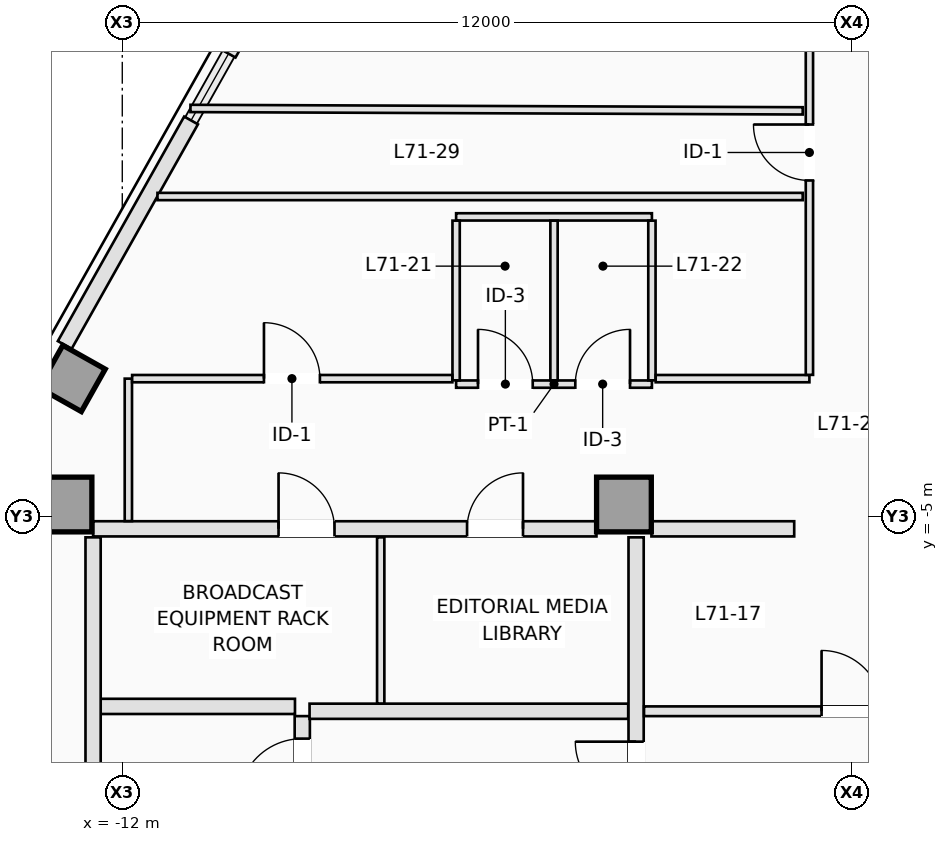
"""IFC4 building model, lengths in metres.
Left out: names, types, materials, properties, quantities, classifications, styles, units other than length and angle.
Written with IfcOpenShell. Run it as: python <this file> out.ifc"""

import sys

from ifc_helpers import new_model, si_unit, direction, frame, frame_2d, origin, origin_2d, place, context, subcontext, project, spatial, rectangle, extrude, element, fill, save


model = new_model("IFC4")
c1 = context("Model", 3, precision=1e-05, world=origin(), true_north=direction((0.0, 1.0)))
c2 = subcontext(c1, "Body", "Model", "MODEL_VIEW")
j1 = project(units=[si_unit("LENGTHUNIT", "METRE"), si_unit("PLANEANGLEUNIT", "RADIAN")], contexts=[c1])
p1 = place(None, origin())
s1 = spatial("IfcSite", under=j1, at=p1, CompositionType="ELEMENT")
p2 = place(p1, origin())
s2 = spatial("IfcBuilding", under=s1, at=p2, CompositionType="ELEMENT")
p3 = place(p2, frame((0.0, 0.0, 256.9)))
s3 = spatial("IfcBuildingStorey", under=s2, at=p3, CompositionType="ELEMENT", Elevation=256.9)
for number, where, z_axis, x_axis in (
    (1, (-12.95, -4.8, 0.0), (0.0, 0.0, 1.0), (1.0, 0.0, 0.0)),
    (2, (-3.75, -4.8, 0.0), (0.0, 0.0, 1.0), (1.0, 0.0, 0.0)),
):
    element("IfcColumn", number, at=place(p3, frame(where, z_axis=z_axis, x_axis=x_axis)), inside=s3, PredefinedType="COLUMN", context=c2, shape_type="SweptSolid", body=[
        extrude(rectangle(XDim=0.9, YDim=0.9, at=origin_2d()), origin(), (0.0, 0.0, 1.0), 3.5),
    ])
p4 = place(p3, frame((-12.825, -2.727, 0.0), z_axis=(0.0, 0.0, 1.0), x_axis=(-0.871575139605, 0.490261946333, 0.0)))
e3 = element("IfcColumn", 3, at=p4, inside=s3, PredefinedType="COLUMN", context=c2, shape_type="SweptSolid", body=[
    extrude(rectangle(XDim=0.8, YDim=0.8, at=origin_2d()), origin(), (0.0, 0.0, 1.0), 3.5),
])
p5 = place(p3, frame((-12.946, -2.177, 0.0), z_axis=(0.0, 0.0, 1.0), x_axis=(0.490244825075, 0.871584770109, 0.0)))
e4 = element("IfcWall", 4, at=p5, inside=s3, PredefinedType="STANDARD", context=c2, shape_type="SweptSolid", body=[
    extrude(rectangle(XDim=4.237, YDim=0.26, at=frame_2d((2.119, 0.0))), origin(), (0.0, 0.0, 1.0), 3.25),
])
p6 = place(p3, frame((-10.251, 2.615, 0.0), z_axis=(0.0, 0.0, 1.0), x_axis=(0.490269447258, 0.871570920284, 0.0)))
e5 = element("IfcWall", 5, at=p6, inside=s3, PredefinedType="STANDARD", context=c2, shape_type="SweptSolid", body=[
    extrude(rectangle(XDim=4.237, YDim=0.26, at=frame_2d((2.118, 0.0))), origin(), (0.0, 0.0, 1.0), 3.25),
])
p7 = place(p3, frame((-9.04, -10.18, 0.0), z_axis=(0.0, 0.0, 1.0), x_axis=(0.0, 1.0, 0.0)))
e6 = element("IfcWall", 6, at=p7, inside=s3, PredefinedType="PARTITIONING", context=c2, shape_type="SweptSolid", body=[
    extrude(rectangle(XDim=1.9, YDim=0.25, at=frame_2d((0.95, 0.0))), origin(), (0.0, 0.0, 1.0), 3.25),
])
p8 = place(p7, frame((0.48, 0.0, 0.0)))
e7 = element("IfcOpeningElement", 7, at=p8, cuts=e6, PredefinedType="OPENING", context=c2, shape_type="SweptSolid", body=[
    extrude(rectangle(XDim=1.05, YDim=2.15, at=frame_2d((0.525, 1.075))), frame((0.0, 0.135, 0.0), z_axis=(0.0, -1.0, 0.0), x_axis=(1.0, 0.0, 0.0)), (0.0, 0.0, 1.0), 0.27),
])
p9 = place(p3, frame((-12.38, -8.12, 0.0), z_axis=(0.0, 0.0, 1.0), x_axis=(1.0, 0.0, 0.0)))
e8 = element("IfcWall", 8, at=p9, inside=s3, PredefinedType="PARTITIONING", context=c2, shape_type="SweptSolid", body=[
    extrude(rectangle(XDim=3.22, YDim=0.25, at=frame_2d((1.61, 0.0))), origin(), (0.0, 0.0, 1.0), 3.25),
])
p10 = place(p3, frame((-12.48, -10.18, 0.0), z_axis=(0.0, 0.0, 1.0), x_axis=(0.0, 1.0, 0.0)))
e9 = element("IfcWall", 9, at=p10, inside=s3, PredefinedType="PARTITIONING", context=c2, shape_type="SweptSolid", body=[
    extrude(rectangle(XDim=4.84, YDim=0.25, at=frame_2d((2.42, 0.0))), origin(), (0.0, 0.0, 1.0), 3.25),
])
p11 = place(p3, frame((-8.92, -8.2, 0.0), z_axis=(0.0, 0.0, 1.0), x_axis=(1.0, 0.0, 0.0)))
e10 = element("IfcWall", 10, at=p11, inside=s3, PredefinedType="PARTITIONING", context=c2, shape_type="SweptSolid", body=[
    extrude(rectangle(XDim=5.24, YDim=0.25, at=frame_2d((2.62, 0.0))), origin(), (0.0, 0.0, 1.0), 3.25),
])
p12 = place(p3, frame((-3.55, -15.898, 0.0), z_axis=(0.0, 0.0, 1.0), x_axis=(0.0, 1.0, 0.0)))
e11 = element("IfcWall", 11, at=p12, inside=s3, PredefinedType="PARTITIONING", context=c2, shape_type="SweptSolid", body=[
    extrude(rectangle(XDim=10.558, YDim=0.25, at=frame_2d((5.279, 0.0))), origin(), (0.0, 0.0, 1.0), 3.25),
])
p13 = place(p12, frame((6.198, 0.0, 0.0)))
e12 = element("IfcOpeningElement", 12, at=p13, cuts=e11, PredefinedType="OPENING", context=c2, shape_type="SweptSolid", body=[
    extrude(rectangle(XDim=1.0, YDim=2.15, at=frame_2d((0.5, 1.075))), frame((0.0, 0.135, 0.0), z_axis=(0.0, -1.0, 0.0), x_axis=(1.0, 0.0, 0.0)), (0.0, 0.0, 1.0), 0.27),
])
p14 = place(p3, frame((-12.48, -5.2, 0.0), z_axis=(0.0, 0.0, 1.0), x_axis=(1.0, 0.0, 0.0)))
e13 = element("IfcWall", 13, at=p14, inside=s3, PredefinedType="PARTITIONING", context=c2, shape_type="SweptSolid", body=[
    extrude(rectangle(XDim=8.278, YDim=0.25, at=frame_2d((4.139, 0.0))), origin(), (0.0, 0.0, 1.0), 3.25),
])
p15 = place(p14, frame((3.05, 0.0, 0.0)))
e14 = element("IfcOpeningElement", 14, at=p15, cuts=e13, PredefinedType="OPENING", context=c2, shape_type="SweptSolid", body=[
    extrude(rectangle(XDim=0.92, YDim=2.12, at=frame_2d((0.46, 1.06))), frame((0.0, 0.135, 0.0), z_axis=(0.0, -1.0, 0.0), x_axis=(1.0, 0.0, 0.0)), (0.0, 0.0, 1.0), 0.27),
])
p16 = place(p14, frame((6.15, 0.0, 0.0)))
e15 = element("IfcOpeningElement", 15, at=p16, cuts=e13, PredefinedType="OPENING", context=c2, shape_type="SweptSolid", body=[
    extrude(rectangle(XDim=0.92, YDim=2.12, at=frame_2d((0.46, 1.06))), frame((0.0, 0.135, 0.0), z_axis=(0.0, -1.0, 0.0), x_axis=(1.0, 0.0, 0.0)), (0.0, 0.0, 1.0), 0.27),
])
p17 = place(p3, frame((-3.298, -5.2, 0.0), z_axis=(0.0, 0.0, 1.0), x_axis=(1.0, 0.0, 0.0)))
e16 = element("IfcWall", 16, at=p17, inside=s3, PredefinedType="PARTITIONING", context=c2, shape_type="SweptSolid", body=[
    extrude(rectangle(XDim=2.348, YDim=0.25, at=frame_2d((1.174, 0.0))), origin(), (0.0, 0.0, 1.0), 3.25),
])
p18 = place(p3, frame((-7.75, -8.073, 0.0), z_axis=(0.0, 0.0, 1.0), x_axis=(0.0, 1.0, 0.0)))
e17 = element("IfcWall", 17, at=p18, inside=s3, PredefinedType="PARTITIONING", context=c2, shape_type="SweptSolid", body=[
    extrude(rectangle(XDim=2.733, YDim=0.12, at=frame_2d((1.366, 0.0))), origin(), (0.0, 0.0, 1.0), 3.25),
])
p19 = place(p3, frame((-3.42, -8.2, 0.0), z_axis=(0.0, 0.0, 1.0), x_axis=(1.0, 0.0, 0.0)))
e18 = element("IfcWall", 18, at=p19, inside=s3, PredefinedType="PARTITIONING", context=c2, shape_type="SweptSolid", body=[
    extrude(rectangle(XDim=6.84, YDim=0.16, at=frame_2d((3.42, 0.0))), origin(), (0.0, 0.0, 1.0), 3.25),
])
p20 = place(p19, frame((2.92, 0.0, 0.0)))
e19 = element("IfcOpeningElement", 19, at=p20, cuts=e18, PredefinedType="OPENING", context=c2, shape_type="SweptSolid", body=[
    extrude(rectangle(XDim=1.0, YDim=2.15, at=frame_2d((0.5, 1.075))), frame((0.0, 0.09, 0.0), z_axis=(0.0, -1.0, 0.0), x_axis=(1.0, 0.0, 0.0)), (0.0, 0.0, 1.0), 0.18),
])
p21 = place(p3, frame((-6.51, -2.82, 0.0), z_axis=(0.0, 0.0, 1.0), x_axis=(1.0, 0.0, 0.0)))
e20 = element("IfcWall", 20, at=p21, inside=s3, PredefinedType="PARTITIONING", context=c2, shape_type="SweptSolid", body=[
    extrude(rectangle(XDim=3.22, YDim=0.12, at=frame_2d((1.61, 0.0))), origin(), (0.0, 0.0, 1.0), 2.943),
])
p22 = place(p21, frame((0.36, 0.0, 0.0)))
e21 = element("IfcOpeningElement", 21, at=p22, cuts=e20, PredefinedType="OPENING", context=c2, shape_type="SweptSolid", body=[
    extrude(rectangle(XDim=0.9, YDim=2.12, at=frame_2d((0.45, 1.06))), frame((0.0, 0.07, 0.0), z_axis=(0.0, -1.0, 0.0), x_axis=(1.0, 0.0, 0.0)), (0.0, 0.0, 1.0), 0.14),
])
p23 = place(p21, frame((1.96, 0.0, 0.0)))
e22 = element("IfcOpeningElement", 22, at=p23, cuts=e20, PredefinedType="OPENING", context=c2, shape_type="SweptSolid", body=[
    extrude(rectangle(XDim=0.9, YDim=2.12, at=frame_2d((0.45, 1.06))), frame((0.0, 0.07, 0.0), z_axis=(0.0, -1.0, 0.0), x_axis=(1.0, 0.0, 0.0)), (0.0, 0.0, 1.0), 0.14),
])
p24 = place(p3, frame((-6.51, -0.07, 0.0), z_axis=(0.0, 0.0, 1.0), x_axis=(1.0, 0.0, 0.0)))
e23 = element("IfcWall", 23, at=p24, inside=s3, PredefinedType="PARTITIONING", context=c2, shape_type="SweptSolid", body=[
    extrude(rectangle(XDim=3.22, YDim=0.12, at=frame_2d((1.61, 0.0))), origin(), (0.0, 0.0, 1.0), 3.25),
])
for number, where, z_axis, x_axis in (
    (24, (-6.51, -2.758, 0.0), (0.0, 0.0, 1.0), (0.0, 1.0, 0.0)),
    (25, (-4.9, -2.758, 0.0), (0.0, 0.0, 1.0), (0.0, 1.0, 0.0)),
):
    element("IfcWall", number, at=place(p3, frame(where, z_axis=z_axis, x_axis=x_axis)), inside=s3, PredefinedType="PARTITIONING", context=c2, shape_type="SweptSolid", body=[
        extrude(rectangle(XDim=2.626, YDim=0.12, at=frame_2d((1.313, 0.0))), origin(), (0.0, 0.0, 1.0), 3.25),
    ])
p25 = place(p3, frame((-3.29, -2.758, 0.0), z_axis=(0.0, 0.0, 1.0), x_axis=(0.0, 1.0, 0.0)))
e26 = element("IfcWall", 26, at=p25, inside=s3, PredefinedType="PARTITIONING", context=c2, shape_type="SweptSolid", body=[
    extrude(rectangle(XDim=2.626, YDim=0.12, at=frame_2d((1.313, 0.0))), origin(), (0.0, 0.0, 1.0), 2.79),
])
p26 = place(p3, frame((-11.9, -5.073, 0.0), z_axis=(0.0, 0.0, 1.0), x_axis=(0.0, 1.0, 0.0)))
e27 = element("IfcWall", 27, at=p26, inside=s3, PredefinedType="PARTITIONING", context=c2, shape_type="SweptSolid", body=[
    extrude(rectangle(XDim=2.343, YDim=0.12, at=frame_2d((1.171, 0.0))), origin(), (0.0, 0.0, 1.0), 3.25),
])
p27 = place(p3, frame((-11.838, -2.73, 0.0), z_axis=(0.0, 0.0, 1.0), x_axis=(1.0, 0.0, 0.0)))
e28 = element("IfcWall", 28, at=p27, inside=s3, PredefinedType="PARTITIONING", context=c2, shape_type="SweptSolid", body=[
    extrude(rectangle(XDim=5.266, YDim=0.12, at=frame_2d((2.633, 0.0))), origin(), (0.0, 0.0, 1.0), 3.25),
])
p28 = place(p27, frame((2.168, 0.0, 0.0)))
e29 = element("IfcOpeningElement", 29, at=p28, cuts=e28, PredefinedType="OPENING", context=c2, shape_type="SweptSolid", body=[
    extrude(rectangle(XDim=0.92, YDim=2.12, at=frame_2d((0.46, 1.06))), frame((0.0, 0.07, 0.0), z_axis=(0.0, -1.0, 0.0), x_axis=(1.0, 0.0, 0.0)), (0.0, 0.0, 1.0), 0.14),
])
p29 = place(p3, frame((-3.228, -2.73, 0.0), z_axis=(0.0, 0.0, 1.0), x_axis=(1.0, 0.0, 0.0)))
e30 = element("IfcWall", 30, at=p29, inside=s3, PredefinedType="PARTITIONING", context=c2, shape_type="SweptSolid", body=[
    extrude(rectangle(XDim=2.528, YDim=0.12, at=frame_2d((1.264, 0.0))), origin(), (0.0, 0.0, 1.0), 2.943),
])
p30 = place(p3, frame((-0.7, -2.668, 0.0), z_axis=(0.0, 0.0, 1.0), x_axis=(0.0, 1.0, 0.0)))
e31 = element("IfcWall", 31, at=p30, inside=s3, PredefinedType="PARTITIONING", context=c2, shape_type="SweptSolid", body=[
    extrude(rectangle(XDim=5.968, YDim=0.12, at=frame_2d((2.984, 0.0))), origin(), (0.0, 0.0, 1.0), 3.25),
])
p31 = place(p30, frame((3.197, 0.0, 0.0)))
e32 = element("IfcOpeningElement", 32, at=p31, cuts=e31, PredefinedType="OPENING", context=c2, shape_type="SweptSolid", body=[
    extrude(rectangle(XDim=0.92, YDim=2.12, at=frame_2d((0.46, 1.06))), frame((0.0, 0.07, 0.0), z_axis=(0.0, -1.0, 0.0), x_axis=(1.0, 0.0, 0.0)), (0.0, 0.0, 1.0), 0.14),
])
p32 = place(p3, frame((-0.81, 1.673, 0.0), z_axis=(0.0, 0.0, 1.0), x_axis=(-0.999992189826, 0.003952250787, 0.0)))
e33 = element("IfcWall", 33, at=p32, inside=s3, PredefinedType="PARTITIONING", context=c2, shape_type="SweptSolid", body=[
    extrude(rectangle(XDim=10.069, YDim=0.12, at=frame_2d((5.034, 0.0))), origin(), (0.0, 0.0, 1.0), 3.25),
])
p33 = place(p3, frame((-0.81, 0.265, 0.0), z_axis=(0.0, 0.0, 1.0), x_axis=(-1.0, 0.0, 0.0)))
e34 = element("IfcWall", 34, at=p33, inside=s3, PredefinedType="PARTITIONING", context=c2, shape_type="SweptSolid", body=[
    extrude(rectangle(XDim=10.611, YDim=0.12, at=frame_2d((5.306, 0.0))), origin(), (0.0, 0.0, 1.0), 3.25),
])
p34 = place(p8, origin())
e35 = element("IfcDoor", 35, at=p34, inside=s3, OperationType="SINGLE_SWING_LEFT", PredefinedType="DOOR", context=c2, shape_type="SweptSolid", body=[
    extrude(rectangle(XDim=1.05, YDim=2.15, at=frame_2d((0.525, 1.075))), frame((0.0, 0.025, 0.0), z_axis=(0.0, -1.0, 0.0), x_axis=(1.0, 0.0, 0.0)), (0.0, 0.0, 1.0), 0.05),
])
fill(e7, e35)
p35 = place(p13, origin())
e36 = element("IfcDoor", 36, at=p35, inside=s3, OperationType="SINGLE_SWING_RIGHT", PredefinedType="DOOR", context=c2, shape_type="SweptSolid", body=[
    extrude(rectangle(XDim=1.0, YDim=2.15, at=frame_2d((0.5, 1.075))), frame((0.0, 0.025, 0.0), z_axis=(0.0, -1.0, 0.0), x_axis=(1.0, 0.0, 0.0)), (0.0, 0.0, 1.0), 0.05),
])
fill(e12, e36)
p36 = place(p15, origin())
e37 = element("IfcDoor", 37, at=p36, inside=s3, OperationType="SINGLE_SWING_LEFT", PredefinedType="DOOR", context=c2, shape_type="SweptSolid", body=[
    extrude(rectangle(XDim=0.92, YDim=2.12, at=frame_2d((0.46, 1.06))), frame((0.0, 0.025, 0.0), z_axis=(0.0, -1.0, 0.0), x_axis=(1.0, 0.0, 0.0)), (0.0, 0.0, 1.0), 0.05),
])
fill(e14, e37)
p37 = place(p16, origin())
e38 = element("IfcDoor", 38, at=p37, inside=s3, OperationType="SINGLE_SWING_RIGHT", PredefinedType="DOOR", context=c2, shape_type="SweptSolid", body=[
    extrude(rectangle(XDim=0.92, YDim=2.12, at=frame_2d((0.46, 1.06))), frame((0.0, 0.025, 0.0), z_axis=(0.0, -1.0, 0.0), x_axis=(1.0, 0.0, 0.0)), (0.0, 0.0, 1.0), 0.05),
])
fill(e15, e38)
p38 = place(p20, origin())
e39 = element("IfcDoor", 39, at=p38, inside=s3, OperationType="SINGLE_SWING_LEFT", PredefinedType="DOOR", context=c2, shape_type="SweptSolid", body=[
    extrude(rectangle(XDim=1.0, YDim=2.15, at=frame_2d((0.5, 1.075))), frame((0.0, 0.025, 0.0), z_axis=(0.0, -1.0, 0.0), x_axis=(1.0, 0.0, 0.0)), (0.0, 0.0, 1.0), 0.05),
])
fill(e19, e39)
p39 = place(p22, origin())
e40 = element("IfcDoor", 40, at=p39, inside=s3, OperationType="SINGLE_SWING_LEFT", PredefinedType="DOOR", context=c2, shape_type="SweptSolid", body=[
    extrude(rectangle(XDim=0.9, YDim=2.12, at=frame_2d((0.45, 1.06))), frame((0.0, 0.025, 0.0), z_axis=(0.0, -1.0, 0.0), x_axis=(1.0, 0.0, 0.0)), (0.0, 0.0, 1.0), 0.05),
])
fill(e21, e40)
p40 = place(p23, origin())
e41 = element("IfcDoor", 41, at=p40, inside=s3, OperationType="SINGLE_SWING_RIGHT", PredefinedType="DOOR", context=c2, shape_type="SweptSolid", body=[
    extrude(rectangle(XDim=0.9, YDim=2.12, at=frame_2d((0.45, 1.06))), frame((0.0, 0.025, 0.0), z_axis=(0.0, -1.0, 0.0), x_axis=(1.0, 0.0, 0.0)), (0.0, 0.0, 1.0), 0.05),
])
fill(e22, e41)
p41 = place(p31, origin())
e42 = element("IfcDoor", 42, at=p41, inside=s3, OperationType="SINGLE_SWING_RIGHT", PredefinedType="DOOR", context=c2, shape_type="SweptSolid", body=[
    extrude(rectangle(XDim=0.92, YDim=2.12, at=frame_2d((0.46, 1.06))), frame((0.0, 0.025, 0.0), z_axis=(0.0, -1.0, 0.0), x_axis=(1.0, 0.0, 0.0)), (0.0, 0.0, 1.0), 0.05),
])
fill(e32, e42)
p42 = place(p28, origin())
e43 = element("IfcDoor", 43, at=p42, inside=s3, OperationType="SINGLE_SWING_LEFT", PredefinedType="DOOR", context=c2, shape_type="SweptSolid", body=[
    extrude(rectangle(XDim=0.92, YDim=2.12, at=frame_2d((0.46, 1.06))), frame((0.0, 0.025, 0.0), z_axis=(0.0, -1.0, 0.0), x_axis=(1.0, 0.0, 0.0)), (0.0, 0.0, 1.0), 0.05),
])
fill(e29, e43)
save(model, sys.argv[1])
